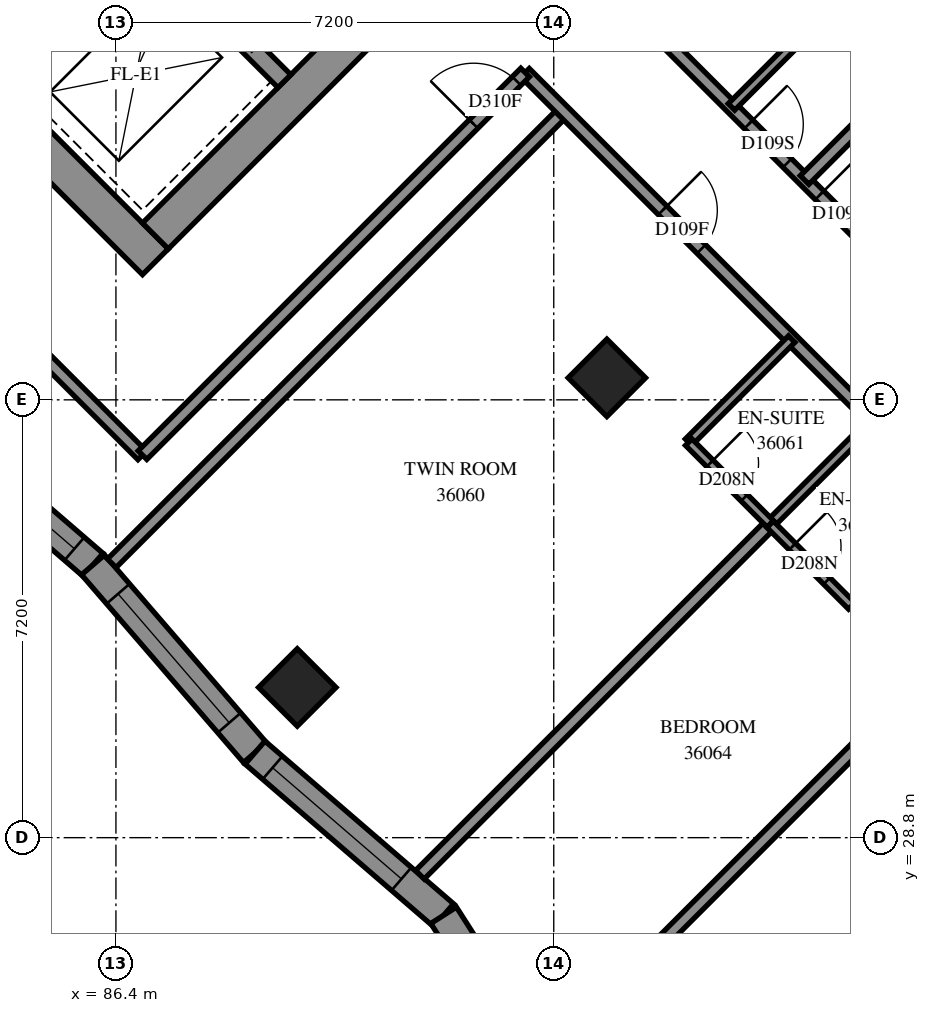
"""IFC4 building model, lengths in metres.
Left out: names, types, materials, properties, quantities, classifications, styles, units other than length and angle.
Written with IfcOpenShell. Run it as: python <this file> out.ifc"""

import sys

from ifc_helpers import new_model, si_unit, direction, frame, frame_2d, origin, origin_2d, place, context, subcontext, project, spatial, polyline, rectangle, outline, extrude, element, fill, save


model = new_model("IFC4")
c1 = context("Model", 3, precision=1e-05, world=origin(), true_north=direction((0.0, 1.0)))
c2 = subcontext(c1, "Body", "Model", "MODEL_VIEW")
j1 = project(units=[si_unit("LENGTHUNIT", "METRE"), si_unit("PLANEANGLEUNIT", "RADIAN")], contexts=[c1])
p1 = place(None, origin())
s1 = spatial("IfcSite", under=j1, at=p1, CompositionType="ELEMENT")
p2 = place(p1, origin())
s2 = spatial("IfcBuilding", under=s1, at=p2, CompositionType="ELEMENT")
p3 = place(p2, frame((0.0, 0.0, 135.4)))
s3 = spatial("IfcBuildingStorey", under=s2, at=p3, CompositionType="ELEMENT", Elevation=135.4)
for number, where, z_axis, x_axis in (
    (1, (94.474, 36.362, 0.0), (0.0, 0.0, 1.0), (0.707, -0.707, 0.0)),
    (2, (89.382, 31.271, 0.0), (0.0, 0.0, 1.0), (0.707, -0.707, 0.0)),
):
    element("IfcColumn", number, at=place(p3, frame(where, z_axis=z_axis, x_axis=x_axis)), inside=s3, PredefinedType="COLUMN", context=c2, shape_type="SweptSolid", body=[
        extrude(rectangle(XDim=0.9, YDim=0.9, at=origin_2d()), origin(), (0.0, 0.0, 1.0), 3.1),
    ])
p4 = place(p3, frame((76.018, 49.302, -0.3), z_axis=(0.0, 0.0, 1.0), x_axis=(0.7071067812, -0.7071067812, 0.0)))
e3 = element("IfcWall", 3, at=p4, inside=s3, PredefinedType="SHEAR", context=c2, shape_type="SweptSolid", body=[
    extrude(rectangle(XDim=15.6, YDim=0.6, at=frame_2d((7.8, 0.0))), origin(), (0.0, 0.0, 1.0), 2.7),
])
p5 = place(p3, frame((87.049, 38.695, -0.3), z_axis=(0.0, 0.0, 1.0), x_axis=(0.7071067812, 0.7071067812, 0.0)))
e4 = element("IfcWall", 4, at=p5, inside=s3, PredefinedType="SHEAR", context=c2, shape_type="SweptSolid", body=[
    extrude(rectangle(XDim=14.4, YDim=0.6, at=frame_2d((7.2, 0.0))), origin(), (0.0, 0.0, 1.0), 2.7),
])
p6 = place(p5, frame((4.55, 0.0, 0.3)))
e5 = element("IfcOpeningElement", 5, at=p6, cuts=e4, PredefinedType="OPENING", context=c2, shape_type="SweptSolid", body=[
    extrude(rectangle(XDim=1.1, YDim=2.1, at=frame_2d((0.55, 1.05))), frame((0.0, 0.31, 0.0), z_axis=(0.0, -1.0, 0.0), x_axis=(1.0, 0.0, 0.0)), (0.0, 0.0, 1.0), 0.62),
])
p7 = place(p5, frame((11.35, 0.0, 0.3)))
e6 = element("IfcOpeningElement", 6, at=p7, cuts=e4, PredefinedType="OPENING", context=c2, shape_type="SweptSolid", body=[
    extrude(rectangle(XDim=1.1, YDim=2.1, at=frame_2d((0.55, 1.05))), frame((0.0, 0.31, 0.0), z_axis=(0.0, -1.0, 0.0), x_axis=(1.0, 0.0, 0.0)), (0.0, 0.0, 1.0), 0.62),
])
p8 = place(p3, frame((84.291, 41.453, 0.0), z_axis=(0.0, 0.0, 1.0), x_axis=(0.7071067812, 0.7071067812, 0.0)))
e7 = element("IfcWall", 7, at=p8, inside=s3, PredefinedType="SOLIDWALL", context=c2, shape_type="SweptSolid", body=[
    extrude(rectangle(XDim=3.3, YDim=0.3, at=frame_2d((1.65, 0.0))), origin(), (0.0, 0.0, 1.0), 3.1),
])
p9 = place(p3, frame((78.988, 51.423, 0.0), z_axis=(0.0, 0.0, 1.0), x_axis=(0.7071067812, -0.7071067812, 0.0)))
e8 = element("IfcWall", 8, at=p9, inside=s3, PredefinedType="SOLIDWALL", context=c2, shape_type="SweptSolid", body=[
    extrude(rectangle(XDim=14.4, YDim=0.3, at=frame_2d((7.2, 0.0))), origin(), (0.0, 0.0, 1.0), 3.1),
])
p10 = place(p9, frame((12.05, 0.0, 0.0)))
e9 = element("IfcOpeningElement", 9, at=p10, cuts=e8, PredefinedType="OPENING", context=c2, shape_type="SweptSolid", body=[
    extrude(rectangle(XDim=1.1, YDim=2.1, at=frame_2d((0.55, 1.05))), frame((0.0, 0.16, 0.0), z_axis=(0.0, -1.0, 0.0), x_axis=(1.0, 0.0, 0.0)), (0.0, 0.0, 1.0), 0.32),
])
p11 = place(p3, frame((82.936, 35.95, 0.0), z_axis=(0.0, 0.0, 1.0), x_axis=(0.7572154684, -0.6531651662, 0.0)))
e10 = element("IfcWall", 10, at=p11, inside=s3, PredefinedType="SOLIDWALL", context=c2, shape_type="SweptSolid", body=[
    extrude(outline(polyline([(-0.018, -0.25), (4.059, -0.25), (4.096, 0.25), (0.018, 0.25), (-0.018, -0.25)])), origin(), (0.0, 0.0, 1.0), 3.1),
])
p12 = place(p11, frame((0.873, 0.0, 0.45)))
e11 = element("IfcOpeningElement", 11, at=p12, cuts=e10, PredefinedType="OPENING", context=c2, shape_type="SweptSolid", body=[
    extrude(rectangle(XDim=2.8, YDim=2.5, at=frame_2d((1.4, 1.25))), frame((0.0, 0.26, 0.0), z_axis=(0.0, -1.0, 0.0), x_axis=(1.0, 0.0, 0.0)), (0.0, 0.0, 1.0), 0.52),
])
p13 = place(p3, frame((86.024, 33.287, 0.0), z_axis=(0.0, 0.0, 1.0), x_axis=(0.6531651662, -0.7572154684, 0.0)))
e12 = element("IfcWall", 12, at=p13, inside=s3, PredefinedType="SOLIDWALL", context=c2, shape_type="SweptSolid", body=[
    extrude(outline(polyline([(0.018, -0.25), (4.096, -0.25), (4.059, 0.25), (-0.018, 0.25), (0.018, -0.25)])), origin(), (0.0, 0.0, 1.0), 3.1),
])
p14 = place(p13, frame((0.63, 0.0, 0.45)))
e13 = element("IfcOpeningElement", 13, at=p14, cuts=e12, PredefinedType="OPENING", context=c2, shape_type="SweptSolid", body=[
    extrude(rectangle(XDim=2.8, YDim=2.5, at=frame_2d((1.4, 1.25))), frame((0.0, 0.26, 0.0), z_axis=(0.0, -1.0, 0.0), x_axis=(1.0, 0.0, 0.0)), (0.0, 0.0, 1.0), 0.52),
])
p15 = place(p3, frame((88.687, 30.199, 0.0), z_axis=(0.0, 0.0, 1.0), x_axis=(0.7572038427, -0.6531786437, 0.0)))
e14 = element("IfcWall", 14, at=p15, inside=s3, PredefinedType="SOLIDWALL", context=c2, shape_type="SweptSolid", body=[
    extrude(outline(polyline([(-0.018, -0.25), (4.059, -0.25), (4.133, 0.25), (0.018, 0.25), (-0.018, -0.25)])), origin(), (0.0, 0.0, 1.0), 3.1),
])
p16 = place(p15, frame((0.381, 0.0, 0.45)))
e15 = element("IfcOpeningElement", 15, at=p16, cuts=e14, PredefinedType="OPENING", context=c2, shape_type="SweptSolid", body=[
    extrude(rectangle(XDim=2.8, YDim=2.5, at=frame_2d((1.4, 1.25))), frame((0.0, 0.26, 0.0), z_axis=(0.0, -1.0, 0.0), x_axis=(1.0, 0.0, 0.0)), (0.0, 0.0, 1.0), 0.52),
])
p17 = place(p3, frame((91.789, 27.523, 0.0), z_axis=(0.0, 0.0, 1.0), x_axis=(0.537613952, -0.8431911044, 0.0)))
e16 = element("IfcWall", 16, at=p17, inside=s3, PredefinedType="SOLIDWALL", context=c2, shape_type="SweptSolid", body=[
    extrude(outline(polyline([(0.037, -0.25), (4.202, -0.25), (3.804, 0.25), (-0.037, 0.25), (0.037, -0.25)])), origin(), (0.0, 0.0, 1.0), 3.1),
])
p18 = place(p17, frame((0.959, 0.0, 0.45)))
e17 = element("IfcOpeningElement", 17, at=p18, cuts=e16, PredefinedType="OPENING", context=c2, shape_type="SweptSolid", body=[
    extrude(rectangle(XDim=1.2, YDim=2.5, at=frame_2d((0.6, 1.25))), frame((0.0, 0.26, 0.0), z_axis=(0.0, -1.0, 0.0), x_axis=(1.0, 0.0, 0.0)), (0.0, 0.0, 1.0), 0.52),
])
p19 = place(p3, frame((86.332, 33.313, 0.0), z_axis=(0.0, 0.0, 1.0), x_axis=(0.7071020252, 0.7071115371, 0.0)))
e18 = element("IfcWall", 18, at=p19, inside=s3, PredefinedType="PARTITIONING", context=c2, shape_type="SweptSolid", body=[
    extrude(rectangle(XDim=10.513, YDim=0.2, at=frame_2d((5.257, 0.0))), origin(), (0.0, 0.0, 1.0), 3.1),
])
p20 = place(p3, frame((93.127, 41.379, 0.0), z_axis=(0.0, 0.0, 1.0), x_axis=(0.7071067812, -0.7071067812, 0.0)))
e19 = element("IfcWall", 19, at=p20, inside=s3, PredefinedType="PARTITIONING", context=c2, shape_type="SweptSolid", body=[
    extrude(rectangle(XDim=9.39, YDim=0.2, at=frame_2d((4.695, 0.0))), origin(), (0.0, 0.0, 1.0), 3.1),
])
p21 = place(p20, frame((3.2, 0.0, 0.0)))
e20 = element("IfcOpeningElement", 20, at=p21, cuts=e19, PredefinedType="OPENING", context=c2, shape_type="SweptSolid", body=[
    extrude(rectangle(XDim=0.9, YDim=2.1, at=frame_2d((0.45, 1.05))), frame((0.0, 0.11, 0.0), z_axis=(0.0, -1.0, 0.0), x_axis=(1.0, 0.0, 0.0)), (0.0, 0.0, 1.0), 0.22),
])
p22 = place(p3, frame((80.423, 41.497, 0.0), z_axis=(0.0, 0.0, 1.0), x_axis=(0.7071067812, -0.7071067812, 0.0)))
e21 = element("IfcWall", 21, at=p22, inside=s3, PredefinedType="PARTITIONING", context=c2, shape_type="SweptSolid", body=[
    extrude(rectangle(XDim=9.065, YDim=0.2, at=frame_2d((4.532, 0.0))), origin(), (0.0, 0.0, 1.0), 3.1),
])
p23 = place(p3, frame((86.837, 35.091, 0.0), z_axis=(0.0, 0.0, 1.0), x_axis=(0.7071067812, 0.7071067812, 0.0)))
e22 = element("IfcWall", 22, at=p23, inside=s3, PredefinedType="PARTITIONING", context=c2, shape_type="SweptSolid", body=[
    extrude(rectangle(XDim=8.898, YDim=0.2, at=frame_2d((4.449, 0.0))), origin(), (0.0, 0.0, 1.0), 3.1),
])
p24 = place(p23, frame((7.7, 0.0, 0.0)))
e23 = element("IfcOpeningElement", 23, at=p24, cuts=e22, PredefinedType="OPENING", context=c2, shape_type="SweptSolid", body=[
    extrude(rectangle(XDim=1.0, YDim=2.1, at=frame_2d((0.5, 1.05))), frame((0.0, 0.11, 0.0), z_axis=(0.0, -1.0, 0.0), x_axis=(1.0, 0.0, 0.0)), (0.0, 0.0, 1.0), 0.22),
])
p25 = place(p3, frame((95.177, 42.157, 0.0), z_axis=(0.0, 0.0, 1.0), x_axis=(0.7071067812, -0.7071067812, 0.0)))
e24 = element("IfcWall", 24, at=p25, inside=s3, PredefinedType="PARTITIONING", context=c2, shape_type="SweptSolid", body=[
    extrude(rectangle(XDim=8.491, YDim=0.2, at=frame_2d((4.245, 0.0))), origin(), (0.0, 0.0, 1.0), 3.1),
])
p26 = place(p25, frame((2.3, 0.0, 0.0)))
e25 = element("IfcOpeningElement", 25, at=p26, cuts=e24, PredefinedType="OPENING", context=c2, shape_type="SweptSolid", body=[
    extrude(rectangle(XDim=0.9, YDim=2.1, at=frame_2d((0.45, 1.05))), frame((0.0, 0.11, 0.0), z_axis=(0.0, -1.0, 0.0), x_axis=(1.0, 0.0, 0.0)), (0.0, 0.0, 1.0), 0.22),
])
p27 = place(p25, frame((3.95, 0.0, 0.0)))
e26 = element("IfcOpeningElement", 26, at=p27, cuts=e24, PredefinedType="OPENING", context=c2, shape_type="SweptSolid", body=[
    extrude(rectangle(XDim=0.9, YDim=2.1, at=frame_2d((0.45, 1.05))), frame((0.0, 0.11, 0.0), z_axis=(0.0, -1.0, 0.0), x_axis=(1.0, 0.0, 0.0)), (0.0, 0.0, 1.0), 0.22),
])
p28 = place(p3, frame((91.398, 28.19, 0.0), z_axis=(0.0, 0.0, 1.0), x_axis=(0.7072294342, 0.7069841069, 0.0)))
e27 = element("IfcWall", 27, at=p28, inside=s3, PredefinedType="PARTITIONING", context=c2, shape_type="SweptSolid", body=[
    extrude(rectangle(XDim=8.152, YDim=0.2, at=frame_2d((4.076, 0.0))), origin(), (0.0, 0.0, 1.0), 3.1),
])
p29 = place(p3, frame((94.923, 26.631, 0.0), z_axis=(0.0, 0.0, 1.0), x_axis=(0.7071067812, 0.7071067812, 0.0)))
e28 = element("IfcWall", 28, at=p29, inside=s3, PredefinedType="PARTITIONING", context=c2, shape_type="SweptSolid", body=[
    extrude(rectangle(XDim=5.926, YDim=0.2, at=frame_2d((2.963, 0.0))), origin(), (0.0, 0.0, 1.0), 2.6),
])
for number, where, z_axis, x_axis in (
    (29, (96.523, 40.817, 0.0), (0.0, 0.0, 1.0), (0.707, 0.707, 0.0)),
    (30, (98.503, 32.615, 0.0), (0.0, 0.0, 1.0), (0.707, 0.707, 0.0)),
):
    element("IfcWall", number, at=place(p3, frame(where, z_axis=z_axis, x_axis=x_axis)), inside=s3, PredefinedType="PARTITIONING", context=c2, shape_type="SweptSolid", body=[
        extrude(rectangle(XDim=2.401, YDim=0.15, at=frame_2d((1.201, 0.0))), origin(), (0.0, 0.0, 1.0), 3.1),
    ])
for number, where, z_axis, x_axis in (
    (31, (97.161, 33.959, 0.0), (0.0, 0.0, 1.0), (0.707, 0.707, 0.0)),
    (32, (95.817, 35.303, 0.0), (0.0, 0.0, 1.0), (0.707, 0.707, 0.0)),
):
    element("IfcWall", number, at=place(p3, frame(where, z_axis=z_axis, x_axis=x_axis)), inside=s3, PredefinedType="PARTITIONING", context=c2, shape_type="SweptSolid", body=[
        extrude(rectangle(XDim=2.398, YDim=0.15, at=frame_2d((1.199, 0.0))), origin(), (0.0, 0.0, 1.0), 3.1),
    ])
p30 = place(p3, frame((97.725, 39.615, 0.0), z_axis=(0.0, 0.0, 1.0), x_axis=(0.7071067812, 0.7071067812, 0.0)))
e33 = element("IfcWall", 33, at=p30, inside=s3, PredefinedType="PARTITIONING", context=c2, shape_type="SweptSolid", body=[
    extrude(rectangle(XDim=1.966, YDim=0.2, at=frame_2d((0.983, 0.0))), origin(), (0.0, 0.0, 1.0), 3.1),
])
p31 = place(p3, frame((95.82, 35.304, 0.0), z_axis=(0.0, 0.0, 1.0), x_axis=(0.7065800724, -0.7076330979, 0.0)))
e34 = element("IfcWall", 34, at=p31, inside=s3, PredefinedType="PARTITIONING", context=c2, shape_type="SweptSolid", body=[
    extrude(rectangle(XDim=1.899, YDim=0.15, at=frame_2d((0.95, 0.0))), origin(), (0.0, 0.0, 1.0), 3.1),
])
p32 = place(p31, frame((0.493, 0.0, 0.0)))
e35 = element("IfcOpeningElement", 35, at=p32, cuts=e34, PredefinedType="OPENING", context=c2, shape_type="SweptSolid", body=[
    extrude(rectangle(XDim=0.8, YDim=2.1, at=frame_2d((0.4, 1.05))), frame((0.0, 0.085, 0.0), z_axis=(0.0, -1.0, 0.0), x_axis=(1.0, 0.0, 0.0)), (0.0, 0.0, 1.0), 0.17),
])
p33 = place(p3, frame((97.159, 33.953, 0.0), z_axis=(0.0, 0.0, 1.0), x_axis=(0.7071067812, -0.7071067812, 0.0)))
e36 = element("IfcWall", 36, at=p33, inside=s3, PredefinedType="PARTITIONING", context=c2, shape_type="SweptSolid", body=[
    extrude(rectangle(XDim=1.898, YDim=0.15, at=frame_2d((0.949, 0.0))), origin(), (0.0, 0.0, 1.0), 3.1),
])
p34 = place(p33, frame((0.517, 0.0, 0.0)))
e37 = element("IfcOpeningElement", 37, at=p34, cuts=e36, PredefinedType="OPENING", context=c2, shape_type="SweptSolid", body=[
    extrude(rectangle(XDim=0.8, YDim=2.1, at=frame_2d((0.4, 1.05))), frame((0.0, 0.085, 0.0), z_axis=(0.0, -1.0, 0.0), x_axis=(1.0, 0.0, 0.0)), (0.0, 0.0, 1.0), 0.17),
])
p35 = place(p12, origin())
e38 = element("IfcWindow", 38, at=p35, inside=s3, PartitioningType="SINGLE_PANEL", PredefinedType="WINDOW", context=c2, shape_type="SweptSolid", body=[
    extrude(rectangle(XDim=2.8, YDim=2.5, at=frame_2d((1.4, 1.25))), frame((0.0, 0.18, 0.0), z_axis=(0.0, -1.0, 0.0), x_axis=(1.0, 0.0, 0.0)), (0.0, 0.0, 1.0), 0.06),
])
fill(e11, e38)
p36 = place(p14, origin())
e39 = element("IfcWindow", 39, at=p36, inside=s3, PartitioningType="SINGLE_PANEL", PredefinedType="WINDOW", context=c2, shape_type="SweptSolid", body=[
    extrude(rectangle(XDim=2.8, YDim=2.5, at=frame_2d((1.4, 1.25))), frame((0.0, 0.18, 0.0), z_axis=(0.0, -1.0, 0.0), x_axis=(1.0, 0.0, 0.0)), (0.0, 0.0, 1.0), 0.06),
])
fill(e13, e39)
p37 = place(p16, origin())
e40 = element("IfcWindow", 40, at=p37, inside=s3, PartitioningType="SINGLE_PANEL", PredefinedType="WINDOW", context=c2, shape_type="SweptSolid", body=[
    extrude(rectangle(XDim=2.8, YDim=2.5, at=frame_2d((1.4, 1.25))), frame((0.0, 0.18, 0.0), z_axis=(0.0, -1.0, 0.0), x_axis=(1.0, 0.0, 0.0)), (0.0, 0.0, 1.0), 0.06),
])
fill(e15, e40)
p38 = place(p26, origin())
e41 = element("IfcDoor", 41, at=p38, inside=s3, OperationType="SINGLE_SWING_RIGHT", PredefinedType="DOOR", context=c2, shape_type="SweptSolid", body=[
    extrude(rectangle(XDim=0.9, YDim=2.1, at=frame_2d((0.45, 1.05))), frame((0.0, 0.025, 0.0), z_axis=(0.0, -1.0, 0.0), x_axis=(1.0, 0.0, 0.0)), (0.0, 0.0, 1.0), 0.05),
])
fill(e25, e41)
p39 = place(p24, origin())
e42 = element("IfcDoor", 42, at=p39, inside=s3, OperationType="SINGLE_SWING_LEFT", PredefinedType="DOOR", context=c2, shape_type="SweptSolid", body=[
    extrude(rectangle(XDim=1.0, YDim=2.1, at=frame_2d((0.5, 1.05))), frame((0.0, 0.025, 0.0), z_axis=(0.0, -1.0, 0.0), x_axis=(1.0, 0.0, 0.0)), (0.0, 0.0, 1.0), 0.05),
])
fill(e23, e42)
p40 = place(p21, origin())
e43 = element("IfcDoor", 43, at=p40, inside=s3, OperationType="SINGLE_SWING_LEFT", PredefinedType="DOOR", context=c2, shape_type="SweptSolid", body=[
    extrude(rectangle(XDim=0.9, YDim=2.1, at=frame_2d((0.45, 1.05))), frame((0.0, 0.025, 0.0), z_axis=(0.0, -1.0, 0.0), x_axis=(1.0, 0.0, 0.0)), (0.0, 0.0, 1.0), 0.05),
])
fill(e20, e43)
p41 = place(p32, origin())
e44 = element("IfcDoor", 44, at=p41, inside=s3, OperationType="SINGLE_SWING_RIGHT", PredefinedType="DOOR", context=c2, shape_type="SweptSolid", body=[
    extrude(rectangle(XDim=0.8, YDim=2.1, at=frame_2d((0.4, 1.05))), frame((0.0, 0.025, 0.0), z_axis=(0.0, -1.0, 0.0), x_axis=(1.0, 0.0, 0.0)), (0.0, 0.0, 1.0), 0.05),
])
fill(e35, e44)
p42 = place(p27, origin())
e45 = element("IfcDoor", 45, at=p42, inside=s3, OperationType="SINGLE_SWING_LEFT", PredefinedType="DOOR", context=c2, shape_type="SweptSolid", body=[
    extrude(rectangle(XDim=0.9, YDim=2.1, at=frame_2d((0.45, 1.05))), frame((0.0, 0.025, 0.0), z_axis=(0.0, -1.0, 0.0), x_axis=(1.0, 0.0, 0.0)), (0.0, 0.0, 1.0), 0.05),
])
fill(e26, e45)
p43 = place(p34, origin())
e46 = element("IfcDoor", 46, at=p43, inside=s3, OperationType="SINGLE_SWING_RIGHT", PredefinedType="DOOR", context=c2, shape_type="SweptSolid", body=[
    extrude(rectangle(XDim=0.8, YDim=2.1, at=frame_2d((0.4, 1.05))), frame((0.0, 0.025, 0.0), z_axis=(0.0, -1.0, 0.0), x_axis=(1.0, 0.0, 0.0)), (0.0, 0.0, 1.0), 0.05),
])
fill(e37, e46)
save(model, sys.argv[1])
